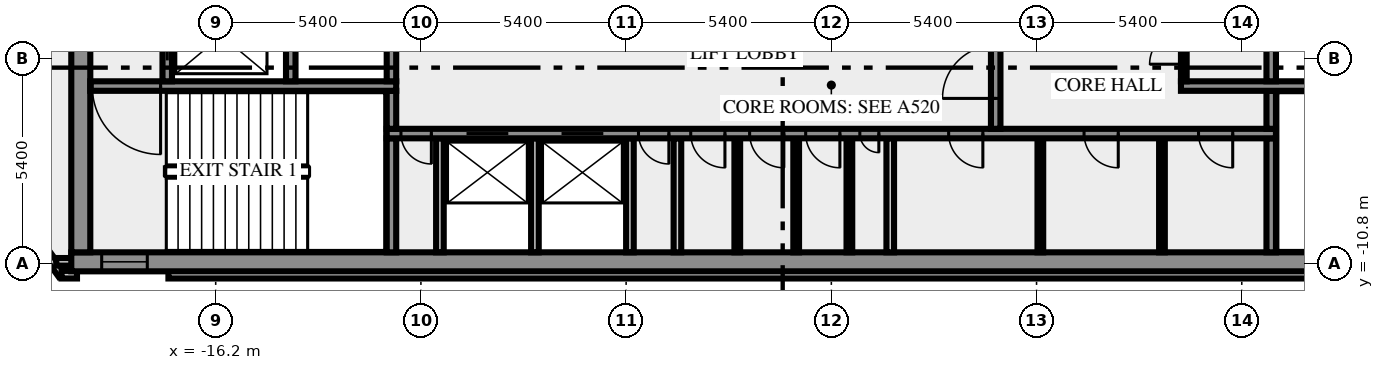
"""IFC4 building model, lengths in metres.
Left out: names, types, materials, properties, quantities, classifications, styles, units other than length and angle.
Written with IfcOpenShell. Run it as: python <this file> out.ifc"""

import sys

from ifc_helpers import new_model, si_unit, direction, frame, frame_2d, origin, place, context, subcontext, project, spatial, rectangle, extrude, element, fill, save


model = new_model("IFC4")
c1 = context("Model", 3, precision=1e-05, world=origin(), true_north=direction((0.0, 1.0)))
c2 = subcontext(c1, "Body", "Model", "MODEL_VIEW")
j1 = project(units=[si_unit("LENGTHUNIT", "METRE"), si_unit("PLANEANGLEUNIT", "RADIAN")], contexts=[c1])
p1 = place(None, origin())
s1 = spatial("IfcSite", under=j1, at=p1, CompositionType="ELEMENT")
p2 = place(p1, origin())
s2 = spatial("IfcBuilding", under=s1, at=p2, CompositionType="ELEMENT")
p3 = place(p2, frame((0.0, 0.0, 319.0)))
s3 = spatial("IfcBuildingStorey", under=s2, at=p3, CompositionType="ELEMENT", Elevation=319.0)
p4 = place(p3, frame((-21.833, -8.909, 0.0), z_axis=(0.0, 0.0, 1.0), x_axis=(0.587766567315, -0.809030569476, 0.0)))
e1 = element("IfcWall", 1, at=p4, inside=s3, PredefinedType="SOLIDWALL", context=c2, shape_type="SweptSolid", body=[
    extrude(rectangle(XDim=2.688, YDim=0.2, at=frame_2d((1.344, 0.0))), origin(), (0.0, 0.0, 1.0), 3.65),
])
p5 = place(p3, frame((-20.256, -11.088, 0.0), z_axis=(0.0, 0.0, 1.0), x_axis=(1.0, 0.0, 0.0)))
e2 = element("IfcWall", 2, at=p5, inside=s3, PredefinedType="SOLIDWALL", context=c2, shape_type="SweptSolid", body=[
    extrude(rectangle(XDim=0.406, YDim=0.2, at=frame_2d((0.203, 0.0))), origin(), (0.0, 0.0, 1.0), 3.65),
])
p6 = place(p3, frame((-17.444, -11.088, 0.0), z_axis=(0.0, 0.0, 1.0), x_axis=(1.0, 0.0, 0.0)))
e3 = element("IfcWall", 3, at=p6, inside=s3, PredefinedType="SOLIDWALL", context=c2, shape_type="SweptSolid", body=[
    extrude(rectangle(XDim=34.888, YDim=0.2, at=frame_2d((17.444, 0.0))), origin(), (0.0, 0.0, 1.0), 3.65),
])
p7 = place(p3, frame((-19.98, -10.75, 0.0), z_axis=(0.0, 0.0, 1.0), x_axis=(-1.0, 0.0, 0.0)))
e4 = element("IfcWall", 4, at=p7, inside=s3, PredefinedType="SOLIDWALL", context=c2, shape_type="SweptSolid", body=[
    extrude(rectangle(XDim=0.417, YDim=0.2, at=frame_2d((0.208, 0.0))), origin(), (0.0, 0.0, 1.0), 3.65),
])
p8 = place(p3, frame((-20.0, -10.75, 0.0), z_axis=(0.0, 0.0, 1.0), x_axis=(1.0, 0.0, 0.0)))
e5 = element("IfcWall", 5, at=p8, inside=s3, PredefinedType="SHEAR", context=c2, shape_type="SweptSolid", body=[
    extrude(rectangle(XDim=40.0, YDim=0.5, at=frame_2d((20.0, 0.0))), origin(), (0.0, 0.0, 1.0), 3.65),
])
p9 = place(p8, frame((0.8, 0.0, 1.0)))
e6 = element("IfcOpeningElement", 6, at=p9, cuts=e5, PredefinedType="OPENING", context=c2, shape_type="SweptSolid", body=[
    extrude(rectangle(XDim=1.2, YDim=1.2, at=frame_2d((0.6, 0.6))), frame((0.0, 0.26, 0.0), z_axis=(0.0, -1.0, 0.0), x_axis=(1.0, 0.0, 0.0)), (0.0, 0.0, 1.0), 0.52),
])
p10 = place(p8, frame((38.0, 0.0, 1.0)))
e7 = element("IfcOpeningElement", 7, at=p10, cuts=e5, PredefinedType="OPENING", context=c2, shape_type="SweptSolid", body=[
    extrude(rectangle(XDim=1.2, YDim=1.2, at=frame_2d((0.6, 0.6))), frame((0.0, 0.26, 0.0), z_axis=(0.0, -1.0, 0.0), x_axis=(1.0, 0.0, 0.0)), (0.0, 0.0, 1.0), 0.52),
])
p11 = place(p3, frame((-19.75, -10.5, 0.0), z_axis=(0.0, 0.0, 1.0), x_axis=(0.0, 1.0, 0.0)))
e8 = element("IfcWall", 8, at=p11, inside=s3, PredefinedType="SHEAR", context=c2, shape_type="SweptSolid", body=[
    extrude(rectangle(XDim=8.8, YDim=0.5, at=frame_2d((4.4, 0.0))), origin(), (0.0, 0.0, 1.0), 3.65),
])
p12 = place(p3, frame((-11.575, -10.5, 0.0), z_axis=(0.0, 0.0, 1.0), x_axis=(0.0, 1.0, 0.0)))
e9 = element("IfcWall", 9, at=p12, inside=s3, PredefinedType="SHEAR", context=c2, shape_type="SweptSolid", body=[
    extrude(rectangle(XDim=3.0, YDim=0.25, at=frame_2d((1.5, 0.0))), origin(), (0.0, 0.0, 1.0), 3.65),
])
for number, where, z_axis, x_axis in (
    (10, (-10.3, -10.5, 0.0), (0.0, 0.0, 1.0), (0.0, 1.0, 0.0)),
    (11, (-7.8, -10.5, 0.0), (0.0, 0.0, 1.0), (0.0, 1.0, 0.0)),
    (12, (-5.3, -10.5, 0.0), (0.0, 0.0, 1.0), (0.0, 1.0, 0.0)),
    (13, (-4.05, -10.5, 0.0), (0.0, 0.0, 1.0), (0.0, 1.0, 0.0)),
):
    element("IfcWall", number, at=place(p3, frame(where, z_axis=z_axis, x_axis=x_axis)), inside=s3, PredefinedType="SOLIDWALL", context=c2, shape_type="SweptSolid", body=[
        extrude(rectangle(XDim=3.0, YDim=0.2, at=frame_2d((1.5, 0.0))), origin(), (0.0, 0.0, 1.0), 3.65),
    ])
for number, where, z_axis, x_axis in (
    (14, (-2.475, -10.5, 0.0), (0.0, 0.0, 1.0), (0.0, 1.0, 0.0)),
    (15, (-0.925, -10.5, 0.0), (0.0, 0.0, 1.0), (0.0, 1.0, 0.0)),
    (16, (0.475, -10.5, 0.0), (0.0, 0.0, 1.0), (0.0, 1.0, 0.0)),
):
    element("IfcWall", number, at=place(p3, frame(where, z_axis=z_axis, x_axis=x_axis)), inside=s3, PredefinedType="PARTITIONING", context=c2, shape_type="SweptSolid", body=[
        extrude(rectangle(XDim=3.0, YDim=0.15, at=frame_2d((1.5, 0.0))), origin(), (0.0, 0.0, 1.0), 3.65),
    ])
p13 = place(p3, frame((1.55, -10.5, 0.0), z_axis=(0.0, 0.0, 1.0), x_axis=(0.0, 1.0, 0.0)))
e17 = element("IfcWall", 17, at=p13, inside=s3, PredefinedType="SOLIDWALL", context=c2, shape_type="SweptSolid", body=[
    extrude(rectangle(XDim=3.0, YDim=0.2, at=frame_2d((1.5, 0.0))), origin(), (0.0, 0.0, 1.0), 3.65),
])
for number, where, z_axis, x_axis in (
    (18, (5.5, -10.5, 0.0), (0.0, 0.0, 1.0), (0.0, 1.0, 0.0)),
    (19, (8.7, -10.5, 0.0), (0.0, 0.0, 1.0), (0.0, 1.0, 0.0)),
):
    element("IfcWall", number, at=place(p3, frame(where, z_axis=z_axis, x_axis=x_axis)), inside=s3, PredefinedType="PARTITIONING", context=c2, shape_type="SweptSolid", body=[
        extrude(rectangle(XDim=3.0, YDim=0.15, at=frame_2d((1.5, 0.0))), origin(), (0.0, 0.0, 1.0), 3.65),
    ])
p14 = place(p3, frame((11.575, -10.5, 0.0), z_axis=(0.0, 0.0, 1.0), x_axis=(0.0, 1.0, 0.0)))
e20 = element("IfcWall", 20, at=p14, inside=s3, PredefinedType="SHEAR", context=c2, shape_type="SweptSolid", body=[
    extrude(rectangle(XDim=3.0, YDim=0.25, at=frame_2d((1.5, 0.0))), origin(), (0.0, 0.0, 1.0), 3.65),
])
p15 = place(p3, frame((11.7, -7.375, 0.0), z_axis=(0.0, 0.0, 1.0), x_axis=(-1.0, 0.0, 0.0)))
e21 = element("IfcWall", 21, at=p15, inside=s3, PredefinedType="SHEAR", context=c2, shape_type="SweptSolid", body=[
    extrude(rectangle(XDim=23.4, YDim=0.25, at=frame_2d((11.7, 0.0))), origin(), (0.0, 0.0, 1.0), 3.65),
])
p16 = place(p15, frame((22.225, 0.0, 0.0)))
e22 = element("IfcOpeningElement", 22, at=p16, cuts=e21, PredefinedType="OPENING", context=c2, shape_type="SweptSolid", body=[
    extrude(rectangle(XDim=0.8, YDim=2.1, at=frame_2d((0.4, 1.05))), frame((0.0, 0.135, 0.0), z_axis=(0.0, -1.0, 0.0), x_axis=(1.0, 0.0, 0.0)), (0.0, 0.0, 1.0), 0.27),
])
p17 = place(p15, frame((20.2, 0.0, 0.0)))
e23 = element("IfcOpeningElement", 23, at=p17, cuts=e21, PredefinedType="OPENING", context=c2, shape_type="SweptSolid", body=[
    extrude(rectangle(XDim=1.1, YDim=2.1, at=frame_2d((0.55, 1.05))), frame((0.0, 0.135, 0.0), z_axis=(0.0, -1.0, 0.0), x_axis=(1.0, 0.0, 0.0)), (0.0, 0.0, 1.0), 0.27),
])
p18 = place(p15, frame((17.7, 0.0, 0.0)))
e24 = element("IfcOpeningElement", 24, at=p18, cuts=e21, PredefinedType="OPENING", context=c2, shape_type="SweptSolid", body=[
    extrude(rectangle(XDim=1.1, YDim=2.1, at=frame_2d((0.55, 1.05))), frame((0.0, 0.135, 0.0), z_axis=(0.0, -1.0, 0.0), x_axis=(1.0, 0.0, 0.0)), (0.0, 0.0, 1.0), 0.27),
])
p19 = place(p15, frame((15.975, 0.0, 0.0)))
e25 = element("IfcOpeningElement", 25, at=p19, cuts=e21, PredefinedType="OPENING", context=c2, shape_type="SweptSolid", body=[
    extrude(rectangle(XDim=0.8, YDim=2.1, at=frame_2d((0.4, 1.05))), frame((0.0, 0.135, 0.0), z_axis=(0.0, -1.0, 0.0), x_axis=(1.0, 0.0, 0.0)), (0.0, 0.0, 1.0), 0.27),
])
p20 = place(p15, frame((14.5, 0.0, 0.0)))
e26 = element("IfcOpeningElement", 26, at=p20, cuts=e21, PredefinedType="OPENING", context=c2, shape_type="SweptSolid", body=[
    extrude(rectangle(XDim=0.9, YDim=2.1, at=frame_2d((0.45, 1.05))), frame((0.0, 0.135, 0.0), z_axis=(0.0, -1.0, 0.0), x_axis=(1.0, 0.0, 0.0)), (0.0, 0.0, 1.0), 0.27),
])
p21 = place(p15, frame((12.95, 0.0, 0.0)))
e27 = element("IfcOpeningElement", 27, at=p21, cuts=e21, PredefinedType="OPENING", context=c2, shape_type="SweptSolid", body=[
    extrude(rectangle(XDim=0.9, YDim=2.1, at=frame_2d((0.45, 1.05))), frame((0.0, 0.135, 0.0), z_axis=(0.0, -1.0, 0.0), x_axis=(1.0, 0.0, 0.0)), (0.0, 0.0, 1.0), 0.27),
])
p22 = place(p15, frame((11.475, 0.0, 0.0)))
e28 = element("IfcOpeningElement", 28, at=p22, cuts=e21, PredefinedType="OPENING", context=c2, shape_type="SweptSolid", body=[
    extrude(rectangle(XDim=0.9, YDim=2.1, at=frame_2d((0.45, 1.05))), frame((0.0, 0.135, 0.0), z_axis=(0.0, -1.0, 0.0), x_axis=(1.0, 0.0, 0.0)), (0.0, 0.0, 1.0), 0.27),
])
p23 = place(p15, frame((10.45, 0.0, 0.0)))
e29 = element("IfcOpeningElement", 29, at=p23, cuts=e21, PredefinedType="OPENING", context=c2, shape_type="SweptSolid", body=[
    extrude(rectangle(XDim=0.5, YDim=2.1, at=frame_2d((0.25, 1.05))), frame((0.0, 0.135, 0.0), z_axis=(0.0, -1.0, 0.0), x_axis=(1.0, 0.0, 0.0)), (0.0, 0.0, 1.0), 0.27),
])
p24 = place(p15, frame((7.713, 0.0, 0.0)))
e30 = element("IfcOpeningElement", 30, at=p24, cuts=e21, PredefinedType="OPENING", context=c2, shape_type="SweptSolid", body=[
    extrude(rectangle(XDim=0.9, YDim=2.1, at=frame_2d((0.45, 1.05))), frame((0.0, 0.135, 0.0), z_axis=(0.0, -1.0, 0.0), x_axis=(1.0, 0.0, 0.0)), (0.0, 0.0, 1.0), 0.27),
])
p25 = place(p15, frame((4.15, 0.0, 0.0)))
e31 = element("IfcOpeningElement", 31, at=p25, cuts=e21, PredefinedType="OPENING", context=c2, shape_type="SweptSolid", body=[
    extrude(rectangle(XDim=0.9, YDim=2.1, at=frame_2d((0.45, 1.05))), frame((0.0, 0.135, 0.0), z_axis=(0.0, -1.0, 0.0), x_axis=(1.0, 0.0, 0.0)), (0.0, 0.0, 1.0), 0.27),
])
p26 = place(p15, frame((1.138, 0.0, 0.0)))
e32 = element("IfcOpeningElement", 32, at=p26, cuts=e21, PredefinedType="OPENING", context=c2, shape_type="SweptSolid", body=[
    extrude(rectangle(XDim=0.9, YDim=2.1, at=frame_2d((0.45, 1.05))), frame((0.0, 0.135, 0.0), z_axis=(0.0, -1.0, 0.0), x_axis=(1.0, 0.0, 0.0)), (0.0, 0.0, 1.0), 0.27),
])
p27 = place(p3, frame((-11.575, -7.25, 0.0), z_axis=(0.0, 0.0, 1.0), x_axis=(0.0, 1.0, 0.0)))
e33 = element("IfcWall", 33, at=p27, inside=s3, PredefinedType="SHEAR", context=c2, shape_type="SweptSolid", body=[
    extrude(rectangle(XDim=1.0, YDim=0.25, at=frame_2d((0.5, 0.0))), origin(), (0.0, 0.0, 1.0), 3.65),
])
p28 = place(p3, frame((4.325, -7.25, 0.0), z_axis=(0.0, 0.0, 1.0), x_axis=(0.0, 1.0, 0.0)))
e34 = element("IfcWall", 34, at=p28, inside=s3, PredefinedType="SHEAR", context=c2, shape_type="SweptSolid", body=[
    extrude(rectangle(XDim=3.0, YDim=0.25, at=frame_2d((1.5, 0.0))), origin(), (0.0, 0.0, 1.0), 3.65),
])
p29 = place(p28, frame((0.8, 0.0, 0.0)))
e35 = element("IfcOpeningElement", 35, at=p29, cuts=e34, PredefinedType="OPENING", context=c2, shape_type="SweptSolid", body=[
    extrude(rectangle(XDim=1.4, YDim=2.1, at=frame_2d((0.7, 1.05))), frame((0.0, 0.135, 0.0), z_axis=(0.0, -1.0, 0.0), x_axis=(1.0, 0.0, 0.0)), (0.0, 0.0, 1.0), 0.27),
])
p30 = place(p3, frame((11.575, -7.25, 0.0), z_axis=(0.0, 0.0, 1.0), x_axis=(0.0, 1.0, 0.0)))
e36 = element("IfcWall", 36, at=p30, inside=s3, PredefinedType="SHEAR", context=c2, shape_type="SweptSolid", body=[
    extrude(rectangle(XDim=1.0, YDim=0.25, at=frame_2d((0.5, 0.0))), origin(), (0.0, 0.0, 1.0), 3.65),
])
p31 = place(p3, frame((-11.45, -6.125, 0.0), z_axis=(0.0, 0.0, 1.0), x_axis=(-1.0, 0.0, 0.0)))
e37 = element("IfcWall", 37, at=p31, inside=s3, PredefinedType="SHEAR", context=c2, shape_type="SweptSolid", body=[
    extrude(rectangle(XDim=8.05, YDim=0.25, at=frame_2d((4.025, 0.0))), origin(), (0.0, 0.0, 1.0), 3.65),
])
p32 = place(p31, frame((6.2, 0.0, 0.0)))
e38 = element("IfcOpeningElement", 38, at=p32, cuts=e37, PredefinedType="OPENING", context=c2, shape_type="SweptSolid", body=[
    extrude(rectangle(XDim=1.8, YDim=2.1, at=frame_2d((0.9, 1.05))), frame((0.0, 0.135, 0.0), z_axis=(0.0, -1.0, 0.0), x_axis=(1.0, 0.0, 0.0)), (0.0, 0.0, 1.0), 0.27),
])
p33 = place(p3, frame((20.0, -6.125, 0.0), z_axis=(0.0, 0.0, 1.0), x_axis=(-1.0, 0.0, 0.0)))
e39 = element("IfcWall", 39, at=p33, inside=s3, PredefinedType="SHEAR", context=c2, shape_type="SweptSolid", body=[
    extrude(rectangle(XDim=10.8, YDim=0.25, at=frame_2d((5.4, 0.0))), origin(), (0.0, 0.0, 1.0), 3.65),
])
p34 = place(p33, frame((0.55, 0.0, 0.0)))
e40 = element("IfcOpeningElement", 40, at=p34, cuts=e39, PredefinedType="OPENING", context=c2, shape_type="SweptSolid", body=[
    extrude(rectangle(XDim=1.8, YDim=2.1, at=frame_2d((0.9, 1.05))), frame((0.0, 0.135, 0.0), z_axis=(0.0, -1.0, 0.0), x_axis=(1.0, 0.0, 0.0)), (0.0, 0.0, 1.0), 0.27),
])
p35 = place(p3, frame((-17.475, -6.0, 0.0), z_axis=(0.0, 0.0, 1.0), x_axis=(0.0, 1.0, 0.0)))
e41 = element("IfcWall", 41, at=p35, inside=s3, PredefinedType="SHEAR", context=c2, shape_type="SweptSolid", body=[
    extrude(rectangle(XDim=4.3, YDim=0.25, at=frame_2d((2.15, 0.0))), origin(), (0.0, 0.0, 1.0), 3.65),
])
p36 = place(p35, frame((0.55, 0.0, 0.0)))
e42 = element("IfcOpeningElement", 42, at=p36, cuts=e41, PredefinedType="OPENING", context=c2, shape_type="SweptSolid", body=[
    extrude(rectangle(XDim=1.3, YDim=2.1, at=frame_2d((0.65, 1.05))), frame((0.0, 0.135, 0.0), z_axis=(0.0, -1.0, 0.0), x_axis=(1.0, 0.0, 0.0)), (0.0, 0.0, 1.0), 0.27),
])
for number, where, z_axis, x_axis in (
    (43, (-14.225, -6.0, 0.0), (0.0, 0.0, 1.0), (0.0, 1.0, 0.0)),
    (44, (-11.575, -6.0, 0.0), (0.0, 0.0, 1.0), (0.0, 1.0, 0.0)),
):
    element("IfcWall", number, at=place(p3, frame(where, z_axis=z_axis, x_axis=x_axis)), inside=s3, PredefinedType="SHEAR", context=c2, shape_type="SweptSolid", body=[
        extrude(rectangle(XDim=1.75, YDim=0.25, at=frame_2d((0.875, 0.0))), origin(), (0.0, 0.0, 1.0), 3.65),
    ])
p37 = place(p3, frame((9.275, -6.0, 0.0), z_axis=(0.0, 0.0, 1.0), x_axis=(0.0, 1.0, 0.0)))
e45 = element("IfcWall", 45, at=p37, inside=s3, PredefinedType="PARTITIONING", context=c2, shape_type="SweptSolid", body=[
    extrude(rectangle(XDim=1.75, YDim=0.15, at=frame_2d((0.875, 0.0))), origin(), (0.0, 0.0, 1.0), 3.65),
])
p38 = place(p37, frame((0.45, 0.0, 0.0)))
e46 = element("IfcOpeningElement", 46, at=p38, cuts=e45, PredefinedType="OPENING", context=c2, shape_type="SweptSolid", body=[
    extrude(rectangle(XDim=0.9, YDim=2.1, at=frame_2d((0.45, 1.05))), frame((0.0, 0.085, 0.0), z_axis=(0.0, -1.0, 0.0), x_axis=(1.0, 0.0, 0.0)), (0.0, 0.0, 1.0), 0.17),
])
p39 = place(p3, frame((11.575, -6.0, 0.0), z_axis=(0.0, 0.0, 1.0), x_axis=(0.0, 1.0, 0.0)))
e47 = element("IfcWall", 47, at=p39, inside=s3, PredefinedType="SHEAR", context=c2, shape_type="SweptSolid", body=[
    extrude(rectangle(XDim=1.75, YDim=0.25, at=frame_2d((0.875, 0.0))), origin(), (0.0, 0.0, 1.0), 3.65),
])
p40 = place(p9, origin())
e48 = element("IfcWindow", 48, at=p40, inside=s3, PartitioningType="SINGLE_PANEL", PredefinedType="WINDOW", context=c2, shape_type="SweptSolid", body=[
    extrude(rectangle(XDim=1.2, YDim=1.2, at=frame_2d((0.6, 0.6))), frame((0.0, 0.03, 0.0), z_axis=(0.0, -1.0, 0.0), x_axis=(1.0, 0.0, 0.0)), (0.0, 0.0, 1.0), 0.06),
])
fill(e6, e48)
p41 = place(p16, origin())
e49 = element("IfcDoor", 49, at=p41, inside=s3, OperationType="SINGLE_SWING_RIGHT", PredefinedType="DOOR", context=c2, shape_type="SweptSolid", body=[
    extrude(rectangle(XDim=0.8, YDim=2.1, at=frame_2d((0.4, 1.05))), frame((0.0, 0.025, 0.0), z_axis=(0.0, -1.0, 0.0), x_axis=(1.0, 0.0, 0.0)), (0.0, 0.0, 1.0), 0.05),
])
fill(e22, e49)
p42 = place(p17, origin())
e50 = element("IfcDoor", 50, at=p42, inside=s3, OperationType="DOUBLE_DOOR_SLIDING", PredefinedType="DOOR", context=c2, shape_type="SweptSolid", body=[
    extrude(rectangle(XDim=1.1, YDim=2.1, at=frame_2d((0.55, 1.05))), frame((0.0, 0.025, 0.0), z_axis=(0.0, -1.0, 0.0), x_axis=(1.0, 0.0, 0.0)), (0.0, 0.0, 1.0), 0.05),
])
fill(e23, e50)
p43 = place(p18, origin())
e51 = element("IfcDoor", 51, at=p43, inside=s3, OperationType="DOUBLE_DOOR_SLIDING", PredefinedType="DOOR", context=c2, shape_type="SweptSolid", body=[
    extrude(rectangle(XDim=1.1, YDim=2.1, at=frame_2d((0.55, 1.05))), frame((0.0, 0.025, 0.0), z_axis=(0.0, -1.0, 0.0), x_axis=(1.0, 0.0, 0.0)), (0.0, 0.0, 1.0), 0.05),
])
fill(e24, e51)
p44 = place(p19, origin())
e52 = element("IfcDoor", 52, at=p44, inside=s3, OperationType="SINGLE_SWING_RIGHT", PredefinedType="DOOR", context=c2, shape_type="SweptSolid", body=[
    extrude(rectangle(XDim=0.8, YDim=2.1, at=frame_2d((0.4, 1.05))), frame((0.0, 0.025, 0.0), z_axis=(0.0, -1.0, 0.0), x_axis=(1.0, 0.0, 0.0)), (0.0, 0.0, 1.0), 0.05),
])
fill(e25, e52)
p45 = place(p20, origin())
e53 = element("IfcDoor", 53, at=p45, inside=s3, OperationType="SINGLE_SWING_RIGHT", PredefinedType="DOOR", context=c2, shape_type="SweptSolid", body=[
    extrude(rectangle(XDim=0.9, YDim=2.1, at=frame_2d((0.45, 1.05))), frame((0.0, 0.025, 0.0), z_axis=(0.0, -1.0, 0.0), x_axis=(1.0, 0.0, 0.0)), (0.0, 0.0, 1.0), 0.05),
])
fill(e26, e53)
p46 = place(p21, origin())
e54 = element("IfcDoor", 54, at=p46, inside=s3, OperationType="SINGLE_SWING_RIGHT", PredefinedType="DOOR", context=c2, shape_type="SweptSolid", body=[
    extrude(rectangle(XDim=0.9, YDim=2.1, at=frame_2d((0.45, 1.05))), frame((0.0, 0.025, 0.0), z_axis=(0.0, -1.0, 0.0), x_axis=(1.0, 0.0, 0.0)), (0.0, 0.0, 1.0), 0.05),
])
fill(e27, e54)
p47 = place(p22, origin())
e55 = element("IfcDoor", 55, at=p47, inside=s3, OperationType="SINGLE_SWING_RIGHT", PredefinedType="DOOR", context=c2, shape_type="SweptSolid", body=[
    extrude(rectangle(XDim=0.9, YDim=2.1, at=frame_2d((0.45, 1.05))), frame((0.0, 0.025, 0.0), z_axis=(0.0, -1.0, 0.0), x_axis=(1.0, 0.0, 0.0)), (0.0, 0.0, 1.0), 0.05),
])
fill(e28, e55)
p48 = place(p23, origin())
e56 = element("IfcDoor", 56, at=p48, inside=s3, OperationType="SINGLE_SWING_LEFT", PredefinedType="DOOR", context=c2, shape_type="SweptSolid", body=[
    extrude(rectangle(XDim=0.5, YDim=2.1, at=frame_2d((0.25, 1.05))), frame((0.0, 0.025, 0.0), z_axis=(0.0, -1.0, 0.0), x_axis=(1.0, 0.0, 0.0)), (0.0, 0.0, 1.0), 0.05),
])
fill(e29, e56)
p49 = place(p24, origin())
e57 = element("IfcDoor", 57, at=p49, inside=s3, OperationType="SINGLE_SWING_LEFT", PredefinedType="DOOR", context=c2, shape_type="SweptSolid", body=[
    extrude(rectangle(XDim=0.9, YDim=2.1, at=frame_2d((0.45, 1.05))), frame((0.0, 0.025, 0.0), z_axis=(0.0, -1.0, 0.0), x_axis=(1.0, 0.0, 0.0)), (0.0, 0.0, 1.0), 0.05),
])
fill(e30, e57)
p50 = place(p25, origin())
e58 = element("IfcDoor", 58, at=p50, inside=s3, OperationType="SINGLE_SWING_LEFT", PredefinedType="DOOR", context=c2, shape_type="SweptSolid", body=[
    extrude(rectangle(XDim=0.9, YDim=2.1, at=frame_2d((0.45, 1.05))), frame((0.0, 0.025, 0.0), z_axis=(0.0, -1.0, 0.0), x_axis=(1.0, 0.0, 0.0)), (0.0, 0.0, 1.0), 0.05),
])
fill(e31, e58)
p51 = place(p26, origin())
e59 = element("IfcDoor", 59, at=p51, inside=s3, OperationType="SINGLE_SWING_LEFT", PredefinedType="DOOR", context=c2, shape_type="SweptSolid", body=[
    extrude(rectangle(XDim=0.9, YDim=2.1, at=frame_2d((0.45, 1.05))), frame((0.0, 0.025, 0.0), z_axis=(0.0, -1.0, 0.0), x_axis=(1.0, 0.0, 0.0)), (0.0, 0.0, 1.0), 0.05),
])
fill(e32, e59)
p52 = place(p29, origin())
e60 = element("IfcDoor", 60, at=p52, inside=s3, OperationType="DOUBLE_DOOR_SINGLE_SWING", PredefinedType="DOOR", context=c2, shape_type="SweptSolid", body=[
    extrude(rectangle(XDim=1.4, YDim=2.1, at=frame_2d((0.7, 1.05))), frame((0.0, 0.025, 0.0), z_axis=(0.0, -1.0, 0.0), x_axis=(1.0, 0.0, 0.0)), (0.0, 0.0, 1.0), 0.05),
])
fill(e35, e60)
p53 = place(p32, origin())
e61 = element("IfcDoor", 61, at=p53, inside=s3, OperationType="DOUBLE_DOOR_SINGLE_SWING", PredefinedType="DOOR", context=c2, shape_type="SweptSolid", body=[
    extrude(rectangle(XDim=1.8, YDim=2.1, at=frame_2d((0.9, 1.05))), frame((0.0, 0.025, 0.0), z_axis=(0.0, -1.0, 0.0), x_axis=(1.0, 0.0, 0.0)), (0.0, 0.0, 1.0), 0.05),
])
fill(e38, e61)
p54 = place(p36, origin())
e62 = element("IfcDoor", 62, at=p54, inside=s3, OperationType="DOUBLE_DOOR_SLIDING", PredefinedType="DOOR", context=c2, shape_type="SweptSolid", body=[
    extrude(rectangle(XDim=1.3, YDim=2.1, at=frame_2d((0.65, 1.05))), frame((0.0, 0.025, 0.0), z_axis=(0.0, -1.0, 0.0), x_axis=(1.0, 0.0, 0.0)), (0.0, 0.0, 1.0), 0.05),
])
fill(e42, e62)
p55 = place(p38, origin())
e63 = element("IfcDoor", 63, at=p55, inside=s3, OperationType="SINGLE_SWING_RIGHT", PredefinedType="DOOR", context=c2, shape_type="SweptSolid", body=[
    extrude(rectangle(XDim=0.9, YDim=2.1, at=frame_2d((0.45, 1.05))), frame((0.0, 0.025, 0.0), z_axis=(0.0, -1.0, 0.0), x_axis=(1.0, 0.0, 0.0)), (0.0, 0.0, 1.0), 0.05),
])
fill(e46, e63)
save(model, sys.argv[1])
